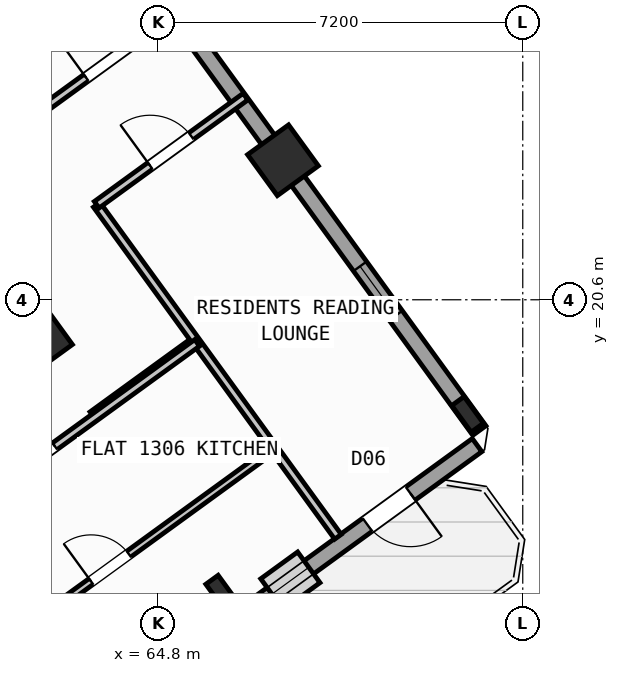
"""IFC4 building model, lengths in metres.
Left out: names, types, materials, properties, quantities, classifications, styles, units other than length and angle.
Written with IfcOpenShell. Run it as: python <this file> out.ifc"""

import sys

from ifc_helpers import new_model, si_unit, direction, frame, frame_2d, origin, origin_2d, place, context, subcontext, project, spatial, rectangle, hollow_rectangle, i_section, extrude, source, transform, mapped, element, fill, save


model = new_model("IFC4")
c1 = context("Model", 3, precision=1e-05, world=origin(), true_north=direction((0.0, 1.0)))
c2 = subcontext(c1, "Body", "Model", "MODEL_VIEW")
j1 = project(units=[si_unit("LENGTHUNIT", "METRE"), si_unit("PLANEANGLEUNIT", "RADIAN")], contexts=[c1])
p1 = place(None, origin())
s1 = spatial("IfcSite", under=j1, at=p1, CompositionType="ELEMENT")
p2 = place(p1, origin())
s2 = spatial("IfcBuilding", under=s1, at=p2, CompositionType="ELEMENT")
p3 = place(p2, frame((0.0, 0.0, 52.8)))
s3 = spatial("IfcBuildingStorey", under=s2, at=p3, CompositionType="ELEMENT", Elevation=52.8)
m1 = source(origin(), c2, "Body", "SweptSolid", [
    extrude(i_section(OverallWidth=0.3, OverallDepth=0.65, WebThickness=0.016, FlangeThickness=0.031, at=origin_2d()), origin(), (0.0, 0.0, 1.0), 3.6),
])
p4 = place(p3, frame((66.058, 14.811, 0.0), z_axis=(0.0, 0.0, 1.0), x_axis=(0.809016994375, 0.587785252292, 0.0)))
e1 = element("IfcColumn", 1, at=p4, inside=s3, PredefinedType="COLUMN", context=c2, shape_type="MappedRepresentation", body=[
    mapped(m1, transform((0.0, 0.0, 0.0), scale=1.0)),
])
m2 = source(origin(), c2, "Body", "SweptSolid", [
    extrude(hollow_rectangle(XDim=1.0, YDim=1.0, WallThickness=0.04, at=origin_2d()), origin(), (0.0, 0.0, 1.0), 3.6),
])
p5 = place(p3, frame((62.414, 19.827, 0.0), z_axis=(0.0, 0.0, 1.0), x_axis=(0.809016994375, 0.587785252292, 0.0)))
e2 = element("IfcColumn", 2, at=p5, inside=s3, PredefinedType="COLUMN", context=c2, shape_type="MappedRepresentation", body=[
    mapped(m2, transform((0.0, 0.0, 0.0), scale=1.0)),
])
p6 = place(p3, frame((70.912, 18.338, 0.0), z_axis=(0.0, 0.0, 1.0), x_axis=(0.809016994375, 0.587785252292, 0.0)))
e3 = element("IfcColumn", 3, at=p6, inside=s3, PredefinedType="COLUMN", context=c2, shape_type="MappedRepresentation", body=[
    mapped(m1, transform((0.0, 0.0, 0.0), scale=1.0)),
])
p7 = place(p3, frame((67.268, 23.354, 0.0), z_axis=(0.0, 0.0, 1.0), x_axis=(0.809016994375, 0.587785252292, 0.0)))
e4 = element("IfcColumn", 4, at=p7, inside=s3, PredefinedType="COLUMN", context=c2, shape_type="MappedRepresentation", body=[
    mapped(m2, transform((0.0, 0.0, 0.0), scale=1.0)),
])
p8 = place(p3, frame((58.455, 35.484, 0.0), z_axis=(0.0, 0.0, 1.0), x_axis=(0.587783625747, -0.809018176127, 0.0)))
e5 = element("IfcWall", 5, at=p8, inside=s3, PredefinedType="STANDARD", context=c2, shape_type="SweptSolid", body=[
    extrude(rectangle(XDim=21.587, YDim=0.32, at=frame_2d((10.794, 0.0))), origin(), (0.0, 0.0, 1.0), 2.725),
])
p9 = place(p8, frame((1.5, 0.0, 0.8)))
e6 = element("IfcOpeningElement", 6, at=p9, cuts=e5, PredefinedType="OPENING", context=c2, shape_type="SweptSolid", body=[
    extrude(rectangle(XDim=2.1, YDim=1.55, at=frame_2d((1.05, 0.775))), frame((0.0, 0.17, 0.0), z_axis=(0.0, -1.0, 0.0), x_axis=(1.0, 0.0, 0.0)), (0.0, 0.0, 1.0), 0.34),
])
p10 = place(p8, frame((5.105, 0.0, 0.85)))
e7 = element("IfcOpeningElement", 7, at=p10, cuts=e5, PredefinedType="OPENING", context=c2, shape_type="SweptSolid", body=[
    extrude(rectangle(XDim=1.5, YDim=1.5, at=frame_2d((0.75, 0.75))), frame((0.0, 0.17, 0.0), z_axis=(0.0, -1.0, 0.0), x_axis=(1.0, 0.0, 0.0)), (0.0, 0.0, 1.0), 0.34),
])
p11 = place(p8, frame((8.954, 0.0, 0.85)))
e8 = element("IfcOpeningElement", 8, at=p11, cuts=e5, PredefinedType="OPENING", context=c2, shape_type="SweptSolid", body=[
    extrude(rectangle(XDim=1.5, YDim=1.5, at=frame_2d((0.75, 0.75))), frame((0.0, 0.17, 0.0), z_axis=(0.0, -1.0, 0.0), x_axis=(1.0, 0.0, 0.0)), (0.0, 0.0, 1.0), 0.34),
])
p12 = place(p8, frame((17.581, 0.0, 0.95)))
e9 = element("IfcOpeningElement", 9, at=p12, cuts=e5, PredefinedType="OPENING", context=c2, shape_type="SweptSolid", body=[
    extrude(rectangle(XDim=1.2, YDim=1.4, at=frame_2d((0.6, 0.7))), frame((0.0, 0.17, 0.0), z_axis=(0.0, -1.0, 0.0), x_axis=(1.0, 0.0, 0.0)), (0.0, 0.0, 1.0), 0.34),
])
p13 = place(p3, frame((71.098, 17.731, 0.0), z_axis=(0.0, 0.0, 1.0), x_axis=(-0.809021120468, -0.587779573171, 0.0)))
e10 = element("IfcWall", 10, at=p13, inside=s3, PredefinedType="STANDARD", context=c2, shape_type="SweptSolid", body=[
    extrude(rectangle(XDim=17.588, YDim=0.32, at=frame_2d((8.794, 0.0))), origin(), (0.0, 0.0, 1.0), 3.35),
])
p14 = place(p13, frame((1.624, 0.0, 0.0)))
e11 = element("IfcOpeningElement", 11, at=p14, cuts=e10, PredefinedType="OPENING", context=c2, shape_type="SweptSolid", body=[
    extrude(rectangle(XDim=1.05, YDim=2.15, at=frame_2d((0.525, 1.075))), frame((0.0, 0.17, 0.0), z_axis=(0.0, -1.0, 0.0), x_axis=(1.0, 0.0, 0.0)), (0.0, 0.0, 1.0), 0.34),
])
p15 = place(p13, frame((4.104, 0.0, 1.0)))
e12 = element("IfcOpeningElement", 12, at=p15, cuts=e10, PredefinedType="OPENING", context=c2, shape_type="SweptSolid", body=[
    extrude(rectangle(XDim=0.9, YDim=1.25, at=frame_2d((0.45, 0.625))), frame((0.0, 0.17, 0.0), z_axis=(0.0, -1.0, 0.0), x_axis=(1.0, 0.0, 0.0)), (0.0, 0.0, 1.0), 0.34),
])
p16 = place(p13, frame((7.879, 0.0, 0.85)))
e13 = element("IfcOpeningElement", 13, at=p16, cuts=e10, PredefinedType="OPENING", context=c2, shape_type="SweptSolid", body=[
    extrude(rectangle(XDim=1.8, YDim=1.5, at=frame_2d((0.9, 0.75))), frame((0.0, 0.17, 0.0), z_axis=(0.0, -1.0, 0.0), x_axis=(1.0, 0.0, 0.0)), (0.0, 0.0, 1.0), 0.34),
])
p17 = place(p13, frame((12.849, 0.0, 0.85)))
e14 = element("IfcOpeningElement", 14, at=p17, cuts=e10, PredefinedType="OPENING", context=c2, shape_type="SweptSolid", body=[
    extrude(rectangle(XDim=1.8, YDim=1.5, at=frame_2d((0.9, 0.75))), frame((0.0, 0.17, 0.0), z_axis=(0.0, -1.0, 0.0), x_axis=(1.0, 0.0, 0.0)), (0.0, 0.0, 1.0), 0.34),
])
p18 = place(p3, frame((63.507, 18.322, 0.0), z_axis=(0.0, 0.0, 1.0), x_axis=(0.809034604122, 0.587761013791, 0.0)))
e15 = element("IfcWall", 15, at=p18, inside=s3, PredefinedType="PARTITIONING", context=c2, shape_type="SweptSolid", body=[
    extrude(rectangle(XDim=2.51, YDim=0.16, at=frame_2d((1.255, 0.0))), origin(), (0.0, 0.0, 1.0), 3.34),
])
p19 = place(p3, frame((68.353, 15.922, 0.0), z_axis=(0.0, 0.0, 1.0), x_axis=(-0.58776839458, 0.809029241952, 0.0)))
e16 = element("IfcWall", 16, at=p19, inside=s3, PredefinedType="PARTITIONING", context=c2, shape_type="SweptSolid", body=[
    extrude(rectangle(XDim=8.1, YDim=0.16, at=frame_2d((4.05, 0.0))), origin(), (0.0, 0.0, 1.0), 3.34),
])
p20 = place(p3, frame((63.592, 22.475, 0.0), z_axis=(0.0, 0.0, 1.0), x_axis=(0.809035546126, 0.58775971715, 0.0)))
e17 = element("IfcWall", 17, at=p20, inside=s3, PredefinedType="PARTITIONING", context=c2, shape_type="SweptSolid", body=[
    extrude(rectangle(XDim=3.63, YDim=0.16, at=frame_2d((1.815, 0.0))), origin(), (0.0, 0.0, 1.0), 3.34),
])
p21 = place(p20, frame((1.305, 0.0, 0.0)))
e18 = element("IfcOpeningElement", 18, at=p21, cuts=e17, PredefinedType="OPENING", context=c2, shape_type="SweptSolid", body=[
    extrude(rectangle(XDim=1.0, YDim=2.1, at=frame_2d((0.5, 1.05))), frame((0.0, 0.09, 0.0), z_axis=(0.0, -1.0, 0.0), x_axis=(1.0, 0.0, 0.0)), (0.0, 0.0, 1.0), 0.18),
])
p22 = place(p3, frame((62.328, 24.215, 0.0), z_axis=(0.0, 0.0, 1.0), x_axis=(0.809003564202, 0.587803736896, 0.0)))
e19 = element("IfcWall", 19, at=p22, inside=s3, PredefinedType="PARTITIONING", context=c2, shape_type="SweptSolid", body=[
    extrude(rectangle(XDim=3.63, YDim=0.16, at=frame_2d((1.815, 0.0))), origin(), (0.0, 0.0, 1.0), 3.34),
])
p23 = place(p22, frame((1.305, 0.0, 0.0)))
e20 = element("IfcOpeningElement", 20, at=p23, cuts=e19, PredefinedType="OPENING", context=c2, shape_type="SweptSolid", body=[
    extrude(rectangle(XDim=1.0, YDim=2.1, at=frame_2d((0.5, 1.05))), frame((0.0, 0.09, 0.0), z_axis=(0.0, -1.0, 0.0), x_axis=(1.0, 0.0, 0.0)), (0.0, 0.0, 1.0), 0.18),
])
p24 = place(p3, frame((53.705, 11.126, 0.0), z_axis=(0.0, 0.0, 1.0), x_axis=(0.809014504436, 0.587788679384, 0.0)))
e21 = element("IfcWall", 21, at=p24, inside=s3, PredefinedType="PARTITIONING", context=c2, shape_type="SweptSolid", body=[
    extrude(rectangle(XDim=14.67, YDim=0.16, at=frame_2d((7.335, 0.0))), origin(), (0.0, 0.0, 1.0), 3.34),
])
p25 = place(p24, frame((10.2, 0.0, 0.0)))
e22 = element("IfcOpeningElement", 22, at=p25, cuts=e21, PredefinedType="OPENING", context=c2, shape_type="SweptSolid", body=[
    extrude(rectangle(XDim=1.0, YDim=2.1, at=frame_2d((0.5, 1.05))), frame((0.0, 0.09, 0.0), z_axis=(0.0, -1.0, 0.0), x_axis=(1.0, 0.0, 0.0)), (0.0, 0.0, 1.0), 0.18),
])
p26 = place(p3, frame((56.249, 9.785, 0.0), z_axis=(0.0, 0.0, 1.0), x_axis=(0.809011747655, 0.587792473715, 0.0)))
e23 = element("IfcWall", 23, at=p26, inside=s3, PredefinedType="PLUMBINGWALL", context=c2, shape_type="SweptSolid", body=[
    extrude(rectangle(XDim=13.4, YDim=0.14, at=frame_2d((6.7, 0.0))), origin(), (0.0, 0.0, 1.0), 3.34),
])
p27 = place(p26, frame((8.94, 0.0, 0.0)))
e24 = element("IfcOpeningElement", 24, at=p27, cuts=e23, PredefinedType="OPENING", context=c2, shape_type="SweptSolid", body=[
    extrude(rectangle(XDim=0.92, YDim=2.08, at=frame_2d((0.46, 1.04))), frame((0.0, 0.08, 0.0), z_axis=(0.0, -1.0, 0.0), x_axis=(1.0, 0.0, 0.0)), (0.0, 0.0, 1.0), 0.16),
])
m3 = source(origin(), c2, "Body", "SweptSolid", [
    extrude(rectangle(XDim=1.05, YDim=2.15, at=frame_2d((0.525, 1.075))), frame((0.0, 0.025, 0.0), z_axis=(0.0, -1.0, 0.0), x_axis=(1.0, 0.0, 0.0)), (0.0, 0.0, 1.0), 0.05),
])
p28 = place(p14, origin())
e25 = element("IfcDoor", 25, at=p28, inside=s3, OperationType="SINGLE_SWING_LEFT", PredefinedType="DOOR", context=c2, shape_type="MappedRepresentation", body=[
    mapped(m3, transform((0.0, 0.0, 0.0), scale=1.0)),
])
fill(e11, e25)
m4 = source(origin(), c2, "Body", "SweptSolid", [
    extrude(rectangle(XDim=1.2, YDim=1.4, at=frame_2d((0.6, 0.7))), frame((0.0, 0.03, 0.0), z_axis=(0.0, -1.0, 0.0), x_axis=(1.0, 0.0, 0.0)), (0.0, 0.0, 1.0), 0.06),
])
p29 = place(p12, origin())
e26 = element("IfcWindow", 26, at=p29, inside=s3, PartitioningType="SINGLE_PANEL", PredefinedType="WINDOW", context=c2, shape_type="MappedRepresentation", body=[
    mapped(m4, transform((0.0, 0.0, 0.0), scale=1.0)),
])
fill(e9, e26)
m5 = source(origin(), c2, "Body", "SweptSolid", [
    extrude(rectangle(XDim=0.9, YDim=1.25, at=frame_2d((0.45, 0.625))), frame((0.0, 0.03, 0.0), z_axis=(0.0, -1.0, 0.0), x_axis=(1.0, 0.0, 0.0)), (0.0, 0.0, 1.0), 0.06),
])
p30 = place(p15, origin())
e27 = element("IfcWindow", 27, at=p30, inside=s3, PartitioningType="SINGLE_PANEL", PredefinedType="WINDOW", context=c2, shape_type="MappedRepresentation", body=[
    mapped(m5, transform((0.0, 0.0, 0.0), scale=1.0)),
])
fill(e12, e27)
m6 = source(origin(), c2, "Body", "SweptSolid", [
    extrude(rectangle(XDim=1.0, YDim=2.1, at=frame_2d((0.5, 1.05))), frame((0.0, 0.025, 0.0), z_axis=(0.0, -1.0, 0.0), x_axis=(1.0, 0.0, 0.0)), (0.0, 0.0, 1.0), 0.05),
])
p31 = place(p23, origin())
e28 = element("IfcDoor", 28, at=p31, inside=s3, OperationType="SINGLE_SWING_LEFT", PredefinedType="DOOR", context=c2, shape_type="MappedRepresentation", body=[
    mapped(m6, transform((0.0, 0.0, 0.0), scale=1.0)),
])
fill(e20, e28)
p32 = place(p21, origin())
e29 = element("IfcDoor", 29, at=p32, inside=s3, OperationType="SINGLE_SWING_LEFT", PredefinedType="DOOR", context=c2, shape_type="MappedRepresentation", body=[
    mapped(m6, transform((0.0, 0.0, 0.0), scale=1.0)),
])
fill(e18, e29)
p33 = place(p25, origin())
e30 = element("IfcDoor", 30, at=p33, inside=s3, OperationType="SINGLE_SWING_RIGHT", PredefinedType="DOOR", context=c2, shape_type="MappedRepresentation", body=[
    mapped(m6, transform((0.0, 0.0, 0.0), scale=1.0)),
])
fill(e22, e30)
m7 = source(origin(), c2, "Body", "SweptSolid", [
    extrude(rectangle(XDim=0.92, YDim=2.08, at=frame_2d((0.46, 1.04))), frame((0.0, 0.025, 0.0), z_axis=(0.0, -1.0, 0.0), x_axis=(1.0, 0.0, 0.0)), (0.0, 0.0, 1.0), 0.05),
])
p34 = place(p27, origin())
e31 = element("IfcDoor", 31, at=p34, inside=s3, OperationType="SINGLE_SWING_LEFT", PredefinedType="DOOR", context=c2, shape_type="MappedRepresentation", body=[
    mapped(m7, transform((0.0, 0.0, 0.0), scale=1.0)),
])
fill(e24, e31)
save(model, sys.argv[1])
